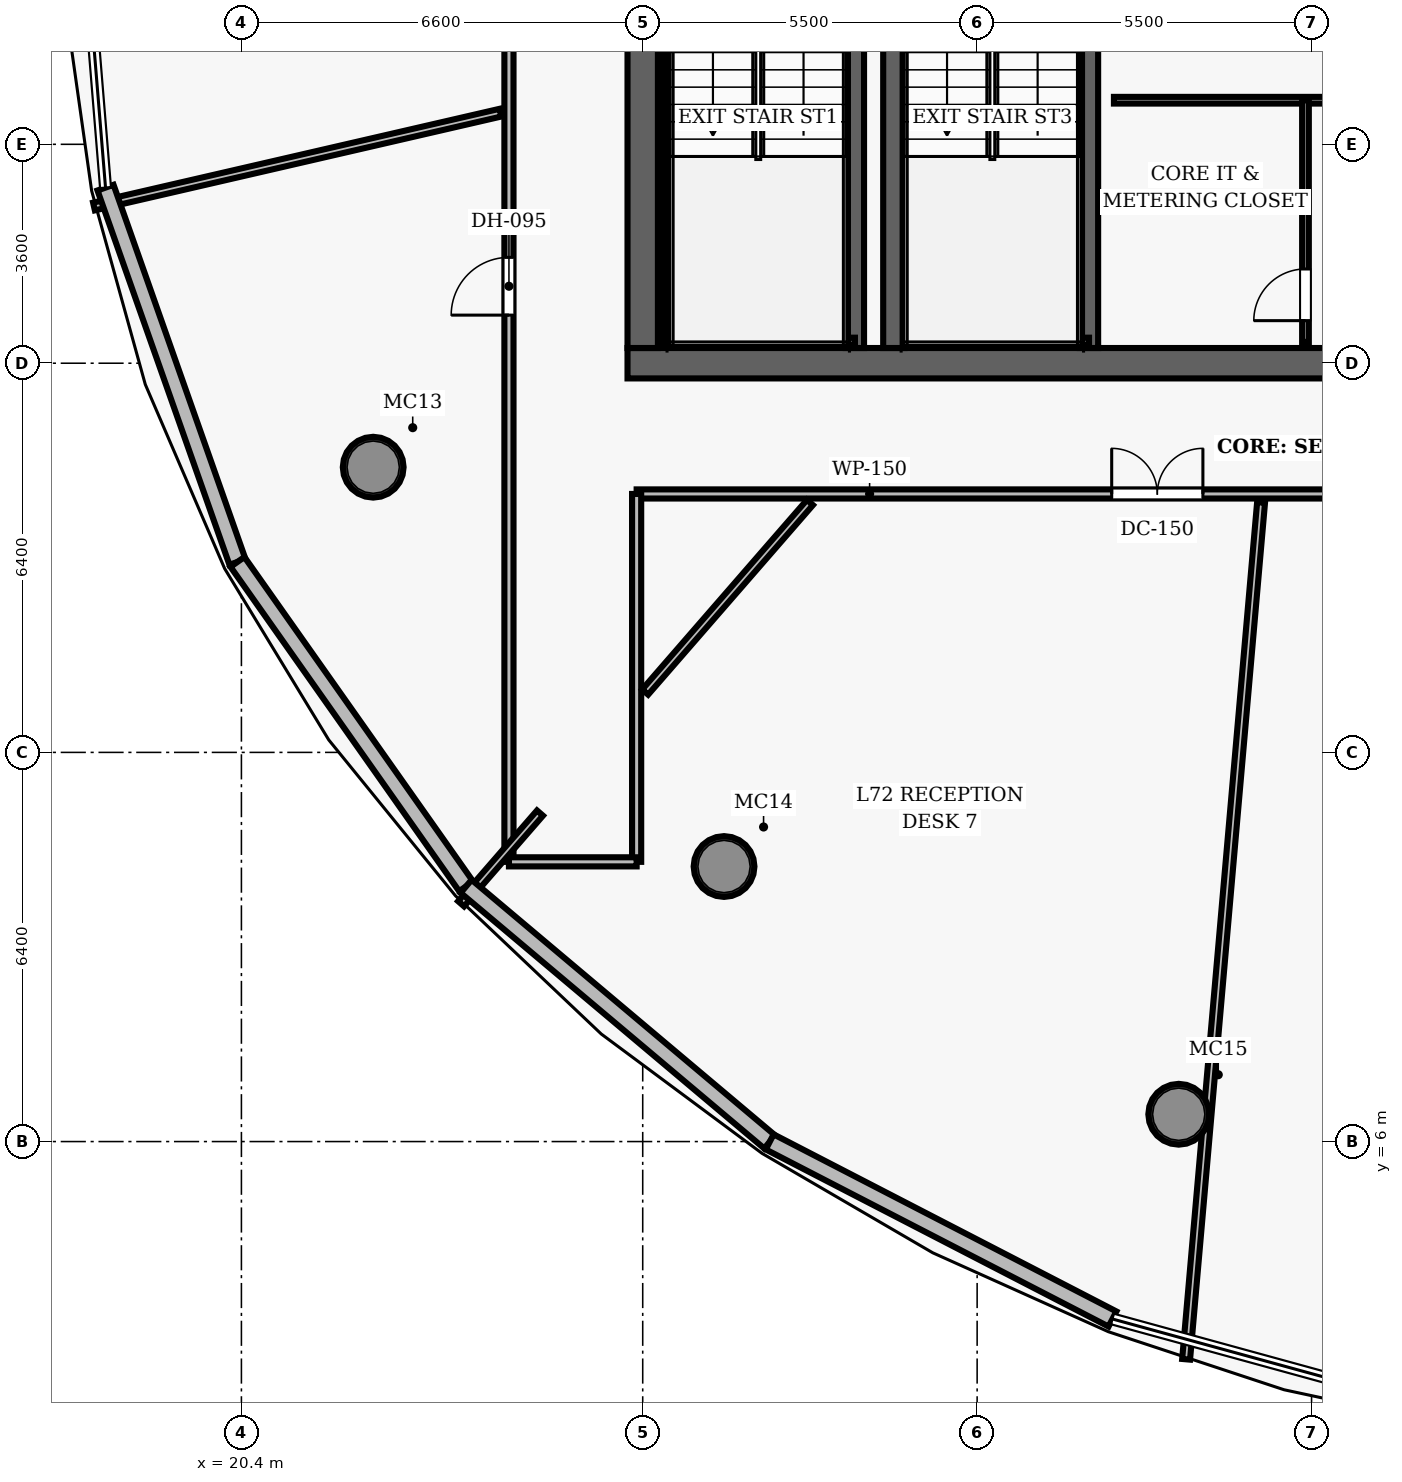
"""IFC4 building model, lengths in metres.
Left out: names, types, materials, properties, quantities, classifications, styles, units other than length and angle.
Written with IfcOpenShell. Run it as: python <this file> out.ifc"""

import sys

from ifc_helpers import new_model, si_unit, direction, frame, frame_2d, origin, origin_2d, place, context, subcontext, project, spatial, rectangle, hollow_circle, extrude, element, fill, save


model = new_model("IFC4")
c1 = context("Model", 3, precision=1e-05, world=origin(), true_north=direction((0.0, 1.0)))
c2 = subcontext(c1, "Body", "Model", "MODEL_VIEW")
j1 = project(units=[si_unit("LENGTHUNIT", "METRE"), si_unit("PLANEANGLEUNIT", "RADIAN")], contexts=[c1])
p1 = place(None, origin())
s1 = spatial("IfcSite", under=j1, at=p1, CompositionType="ELEMENT")
p2 = place(p1, origin())
s2 = spatial("IfcBuilding", under=s1, at=p2, CompositionType="ELEMENT")
p3 = place(p2, frame((0.0, 0.0, 284.4)))
s3 = spatial("IfcBuildingStorey", under=s2, at=p3, CompositionType="ELEMENT", Elevation=284.4)
p4 = place(p3, frame((26.75, 18.8, 0.0), z_axis=(0.0, 0.0, 1.0), x_axis=(1.0, 0.0, 0.0)))
e1 = element("IfcWall", 1, at=p4, inside=s3, PredefinedType="SHEAR", context=c2, shape_type="SweptSolid", body=[
    extrude(rectangle(XDim=22.5, YDim=0.5, at=frame_2d((11.25, 0.0))), origin(), (0.0, 0.0, 1.0), 3.85),
])
p5 = place(p4, frame((14.47, 0.0, 0.0)))
e2 = element("IfcOpeningElement", 2, at=p5, cuts=e1, PredefinedType="OPENING", context=c2, shape_type="SweptSolid", body=[
    extrude(rectangle(XDim=1.05, YDim=2.15, at=frame_2d((0.525, 1.075))), frame((0.0, 0.26, 0.0), z_axis=(0.0, -1.0, 0.0), x_axis=(1.0, 0.0, 0.0)), (0.0, 0.0, 1.0), 0.52),
])
p6 = place(p3, frame((27.0, 19.05, 0.0), z_axis=(0.0, 0.0, 1.0), x_axis=(0.0, 1.0, 0.0)))
e3 = element("IfcWall", 3, at=p6, inside=s3, PredefinedType="SHEAR", context=c2, shape_type="SweptSolid", body=[
    extrude(rectangle(XDim=13.9, YDim=0.5, at=frame_2d((6.95, 0.0))), origin(), (0.0, 0.0, 1.0), 3.85),
])
p7 = place(p6, frame((8.2, 0.0, 0.0)))
e4 = element("IfcOpeningElement", 4, at=p7, cuts=e3, PredefinedType="OPENING", context=c2, shape_type="SweptSolid", body=[
    extrude(rectangle(XDim=1.05, YDim=2.15, at=frame_2d((0.525, 1.075))), frame((0.0, 0.26, 0.0), z_axis=(0.0, -1.0, 0.0), x_axis=(1.0, 0.0, 0.0)), (0.0, 0.0, 1.0), 0.52),
])
p8 = place(p3, frame((31.13, 19.05, 0.0), z_axis=(0.0, 0.0, 1.0), x_axis=(0.0, 1.0, 0.0)))
e5 = element("IfcWall", 5, at=p8, inside=s3, PredefinedType="SHEAR", context=c2, shape_type="SweptSolid", body=[
    extrude(rectangle(XDim=13.9, YDim=0.35, at=frame_2d((6.95, 0.0))), origin(), (0.0, 0.0, 1.0), 3.85),
])
for number, where, z_axis, x_axis in (
    (6, (22.567, 17.09, 0.0), (0.0, 0.0, 1.0), (1.0, 0.0, 0.0)),
    (7, (28.338, 10.523, 0.0), (0.0, 0.0, 1.0), (1.0, 0.0, 0.0)),
    (8, (35.815, 6.449, 0.0), (0.0, 0.0, 1.0), (1.0, 0.0, 0.0)),
):
    element("IfcColumn", number, at=place(p3, frame(where, z_axis=z_axis, x_axis=x_axis)), inside=s3, PredefinedType="COLUMN", context=c2, shape_type="SweptSolid", body=[
        extrude(hollow_circle(Radius=0.5, WallThickness=0.045, at=origin_2d()), origin(), (0.0, 0.0, 1.0), 3.85),
    ])
p9 = place(p3, frame((30.49, 19.05, 0.0), z_axis=(0.0, 0.0, 1.0), x_axis=(0.0, 1.0, 0.0)))
e9 = element("IfcWall", 9, at=p9, inside=s3, PredefinedType="SHEAR", context=c2, shape_type="SweptSolid", body=[
    extrude(rectangle(XDim=7.5, YDim=0.3, at=frame_2d((3.75, 0.0))), origin(), (0.0, 0.0, 1.0), 3.85),
])
p10 = place(p3, frame((27.395, 19.1, 0.0), z_axis=(0.0, 0.0, 1.0), x_axis=(0.0, 1.0, 0.0)))
e10 = element("IfcWall", 10, at=p10, inside=s3, PredefinedType="SHEAR", context=c2, shape_type="SweptSolid", body=[
    extrude(rectangle(XDim=7.45, YDim=0.12, at=frame_2d((3.725, 0.0))), origin(), (0.0, 0.0, 1.0), 3.85),
])
p11 = place(p3, frame((27.395, 19.16, 0.0), z_axis=(0.0, 0.0, 1.0), x_axis=(1.0, 0.0, 0.0)))
e11 = element("IfcWall", 11, at=p11, inside=s3, PredefinedType="SHEAR", context=c2, shape_type="SweptSolid", body=[
    extrude(rectangle(XDim=3.095, YDim=0.12, at=frame_2d((1.547, 0.0))), origin(), (0.0, 0.0, 1.0), 3.85),
])
p12 = place(p3, frame((34.34, 19.05, 0.0), z_axis=(0.0, 0.0, 1.0), x_axis=(0.0, 1.0, 0.0)))
e12 = element("IfcWall", 12, at=p12, inside=s3, PredefinedType="SHEAR", context=c2, shape_type="SweptSolid", body=[
    extrude(rectangle(XDim=7.5, YDim=0.3, at=frame_2d((3.75, 0.0))), origin(), (0.0, 0.0, 1.0), 3.85),
])
p13 = place(p3, frame((31.3, 19.16, 0.0), z_axis=(0.0, 0.0, 1.0), x_axis=(1.0, 0.0, 0.0)))
e13 = element("IfcWall", 13, at=p13, inside=s3, PredefinedType="SHEAR", context=c2, shape_type="SweptSolid", body=[
    extrude(rectangle(XDim=3.04, YDim=0.12, at=frame_2d((1.52, 0.0))), origin(), (0.0, 0.0, 1.0), 3.85),
])
p14 = place(p3, frame((34.75, 23.125, 0.0), z_axis=(0.0, 0.0, 1.0), x_axis=(1.0, 0.0, 0.0)))
e14 = element("IfcWall", 14, at=p14, inside=s3, PredefinedType="PARTITIONING", context=c2, shape_type="SweptSolid", body=[
    extrude(rectangle(XDim=6.25, YDim=0.11, at=frame_2d((3.125, 0.0))), origin(), (0.0, 0.0, 1.0), 3.04),
])
p15 = place(p3, frame((37.9, 19.15, 0.0), z_axis=(0.0, 0.0, 1.0), x_axis=(0.0, 1.0, 0.0)))
e15 = element("IfcWall", 15, at=p15, inside=s3, PredefinedType="PARTITIONING", context=c2, shape_type="SweptSolid", body=[
    extrude(rectangle(XDim=3.975, YDim=0.11, at=frame_2d((1.988, 0.0))), origin(), (0.0, 0.0, 1.0), 3.04),
])
p16 = place(p15, frame((0.35, 0.0, 0.0)))
e16 = element("IfcOpeningElement", 16, at=p16, cuts=e15, PredefinedType="OPENING", context=c2, shape_type="SweptSolid", body=[
    extrude(rectangle(XDim=0.85, YDim=2.1, at=frame_2d((0.425, 1.05))), frame((0.0, 0.065, 0.0), z_axis=(0.0, -1.0, 0.0), x_axis=(1.0, 0.0, 0.0)), (0.0, 0.0, 1.0), 0.13),
])
p17 = place(p3, frame((26.9, 16.65, 0.0), z_axis=(0.0, 0.0, 1.0), x_axis=(1.0, 0.0, 0.0)))
e17 = element("IfcWall", 17, at=p17, inside=s3, PredefinedType="PARTITIONING", context=c2, shape_type="SweptSolid", body=[
    extrude(rectangle(XDim=22.2, YDim=0.15, at=frame_2d((11.1, 0.0))), origin(), (0.0, 0.0, 1.0), 3.04),
])
p18 = place(p17, frame((7.813, 0.0, 0.0)))
e18 = element("IfcOpeningElement", 18, at=p18, cuts=e17, PredefinedType="OPENING", context=c2, shape_type="SweptSolid", body=[
    extrude(rectangle(XDim=1.5, YDim=2.2, at=frame_2d((0.75, 1.1))), frame((0.0, 0.085, 0.0), z_axis=(0.0, -1.0, 0.0), x_axis=(1.0, 0.0, 0.0)), (0.0, 0.0, 1.0), 0.17),
])
p19 = place(p17, frame((14.125, 0.0, 0.0)))
e19 = element("IfcOpeningElement", 19, at=p19, cuts=e17, PredefinedType="OPENING", context=c2, shape_type="SweptSolid", body=[
    extrude(rectangle(XDim=0.95, YDim=2.15, at=frame_2d((0.475, 1.075))), frame((0.0, 0.085, 0.0), z_axis=(0.0, -1.0, 0.0), x_axis=(1.0, 0.0, 0.0)), (0.0, 0.0, 1.0), 0.17),
])
p20 = place(p17, frame((17.741, 0.0, 0.0)))
e20 = element("IfcOpeningElement", 20, at=p20, cuts=e17, PredefinedType="OPENING", context=c2, shape_type="SweptSolid", body=[
    extrude(rectangle(XDim=1.5, YDim=2.2, at=frame_2d((0.75, 1.1))), frame((0.0, 0.085, 0.0), z_axis=(0.0, -1.0, 0.0), x_axis=(1.0, 0.0, 0.0)), (0.0, 0.0, 1.0), 0.17),
])
p21 = place(p3, frame((24.8, 10.6, 0.0), z_axis=(0.0, 0.0, 1.0), x_axis=(0.0, 1.0, 0.0)))
e21 = element("IfcWall", 21, at=p21, inside=s3, PredefinedType="PARTITIONING", context=c2, shape_type="SweptSolid", body=[
    extrude(rectangle(XDim=30.8, YDim=0.15, at=frame_2d((15.4, 0.0))), origin(), (0.0, 0.0, 1.0), 3.04),
])
p22 = place(p21, frame((18.545, 0.0, 0.0)))
e22 = element("IfcOpeningElement", 22, at=p22, cuts=e21, PredefinedType="OPENING", context=c2, shape_type="SweptSolid", body=[
    extrude(rectangle(XDim=0.95, YDim=2.15, at=frame_2d((0.475, 1.075))), frame((0.0, 0.085, 0.0), z_axis=(0.0, -1.0, 0.0), x_axis=(1.0, 0.0, 0.0)), (0.0, 0.0, 1.0), 0.17),
])
p23 = place(p21, frame((8.991, 0.0, 0.0)))
e23 = element("IfcOpeningElement", 23, at=p23, cuts=e21, PredefinedType="OPENING", context=c2, shape_type="SweptSolid", body=[
    extrude(rectangle(XDim=0.95, YDim=2.15, at=frame_2d((0.475, 1.075))), frame((0.0, 0.085, 0.0), z_axis=(0.0, -1.0, 0.0), x_axis=(1.0, 0.0, 0.0)), (0.0, 0.0, 1.0), 0.17),
])
p24 = place(p3, frame((26.9, 10.6, 0.0), z_axis=(0.0, 0.0, 1.0), x_axis=(0.0, 1.0, 0.0)))
e24 = element("IfcWall", 24, at=p24, inside=s3, PredefinedType="PARTITIONING", context=c2, shape_type="SweptSolid", body=[
    extrude(rectangle(XDim=6.05, YDim=0.15, at=frame_2d((3.025, 0.0))), origin(), (0.0, 0.0, 1.0), 3.04),
])
p25 = place(p3, frame((24.8, 10.6, 0.0), z_axis=(0.0, 0.0, 1.0), x_axis=(1.0, 0.0, 0.0)))
e25 = element("IfcWall", 25, at=p25, inside=s3, PredefinedType="PARTITIONING", context=c2, shape_type="SweptSolid", body=[
    extrude(rectangle(XDim=2.1, YDim=0.15, at=frame_2d((1.05, 0.0))), origin(), (0.0, 0.0, 1.0), 3.04),
])
p26 = place(p3, frame((24.66, 22.92, 0.0), z_axis=(0.0, 0.0, 1.0), x_axis=(-0.974373199784, -0.224937474739, 0.0)))
e26 = element("IfcWall", 26, at=p26, inside=s3, PredefinedType="PARTITIONING", context=c2, shape_type="SweptSolid", body=[
    extrude(rectangle(XDim=6.861, YDim=0.13, at=frame_2d((3.43, 0.0))), origin(), (0.0, 0.0, 1.0), 3.04),
])
p27 = place(p3, frame((29.75, 16.51, 0.0), z_axis=(0.0, 0.0, 1.0), x_axis=(-0.656070441922, -0.754699658961, 0.0)))
e27 = element("IfcWall", 27, at=p27, inside=s3, PredefinedType="PARTITIONING", context=c2, shape_type="SweptSolid", body=[
    extrude(rectangle(XDim=4.131, YDim=0.13, at=frame_2d((2.066, 0.0))), origin(), (0.0, 0.0, 1.0), 3.04),
])
p28 = place(p3, frame((25.311, 11.402, 0.0), z_axis=(0.0, 0.0, 1.0), x_axis=(-0.656123689606, -0.754653366743, 0.0)))
e28 = element("IfcWall", 28, at=p28, inside=s3, PredefinedType="PARTITIONING", context=c2, shape_type="SweptSolid", body=[
    extrude(rectangle(XDim=1.977, YDim=0.13, at=frame_2d((0.989, 0.0))), origin(), (0.0, 0.0, 1.0), 3.04),
])
p29 = place(p3, frame((37.17, 16.51, 0.0), z_axis=(0.0, 0.0, 1.0), x_axis=(-0.087147251736, -0.996195440923, 0.0)))
e29 = element("IfcWall", 29, at=p29, inside=s3, PredefinedType="PARTITIONING", context=c2, shape_type="SweptSolid", body=[
    extrude(rectangle(XDim=14.145, YDim=0.13, at=frame_2d((7.072, 0.0))), origin(), (0.0, 0.0, 1.0), 3.04),
])
p30 = place(p3, frame((20.335, 15.532, 0.0), z_axis=(0.0, 0.0, 1.0), x_axis=(-0.33248553101, 0.943108356271, 0.0)))
e30 = element("IfcWall", 30, at=p30, inside=s3, PredefinedType="SOLIDWALL", context=c2, shape_type="SweptSolid", body=[
    extrude(rectangle(XDim=6.527, YDim=0.28, at=frame_2d((3.264, 0.0))), origin(), (0.0, 0.0, 1.0), 3.625),
])
p31 = place(p3, frame((24.096, 10.198, 0.0), z_axis=(0.0, 0.0, 1.0), x_axis=(-0.576170538891, 0.817329499109, 0.0)))
e31 = element("IfcWall", 31, at=p31, inside=s3, PredefinedType="SOLIDWALL", context=c2, shape_type="SweptSolid", body=[
    extrude(rectangle(XDim=6.527, YDim=0.28, at=frame_2d((3.263, 0.0))), origin(), (0.0, 0.0, 1.0), 3.625),
])
p32 = place(p3, frame((29.088, 5.994, 0.0), z_axis=(0.0, 0.0, 1.0), x_axis=(-0.76500431734, 0.64402515048, 0.0)))
e32 = element("IfcWall", 32, at=p32, inside=s3, PredefinedType="SOLIDWALL", context=c2, shape_type="SweptSolid", body=[
    extrude(rectangle(XDim=6.526, YDim=0.28, at=frame_2d((3.263, 0.0))), origin(), (0.0, 0.0, 1.0), 3.625),
])
p33 = place(p3, frame((34.726, 3.082, 0.0), z_axis=(0.0, 0.0, 1.0), x_axis=(-0.888438982509, 0.45899474328, 0.0)))
e33 = element("IfcWall", 33, at=p33, inside=s3, PredefinedType="SOLIDWALL", context=c2, shape_type="SweptSolid", body=[
    extrude(rectangle(XDim=6.345, YDim=0.28, at=frame_2d((3.172, 0.0))), origin(), (0.0, 0.0, 1.0), 3.625),
])
p34 = place(p16, origin())
e34 = element("IfcDoor", 34, at=p34, inside=s3, OperationType="SINGLE_SWING_LEFT", PredefinedType="DOOR", context=c2, shape_type="SweptSolid", body=[
    extrude(rectangle(XDim=0.85, YDim=2.1, at=frame_2d((0.425, 1.05))), frame((0.0, 0.025, 0.0), z_axis=(0.0, -1.0, 0.0), x_axis=(1.0, 0.0, 0.0)), (0.0, 0.0, 1.0), 0.05),
])
fill(e16, e34)
p35 = place(p23, origin())
e35 = element("IfcDoor", 35, at=p35, inside=s3, OperationType="SINGLE_SWING_LEFT", PredefinedType="DOOR", context=c2, shape_type="SweptSolid", body=[
    extrude(rectangle(XDim=0.95, YDim=2.15, at=frame_2d((0.475, 1.075))), frame((0.0, 0.025, 0.0), z_axis=(0.0, -1.0, 0.0), x_axis=(1.0, 0.0, 0.0)), (0.0, 0.0, 1.0), 0.05),
])
fill(e23, e35)
p36 = place(p18, origin())
e36 = element("IfcDoor", 36, at=p36, inside=s3, OperationType="DOUBLE_DOOR_SINGLE_SWING", PredefinedType="DOOR", context=c2, shape_type="SweptSolid", body=[
    extrude(rectangle(XDim=1.5, YDim=2.2, at=frame_2d((0.75, 1.1))), frame((0.0, 0.025, 0.0), z_axis=(0.0, -1.0, 0.0), x_axis=(1.0, 0.0, 0.0)), (0.0, 0.0, 1.0), 0.05),
])
fill(e18, e36)
save(model, sys.argv[1])
